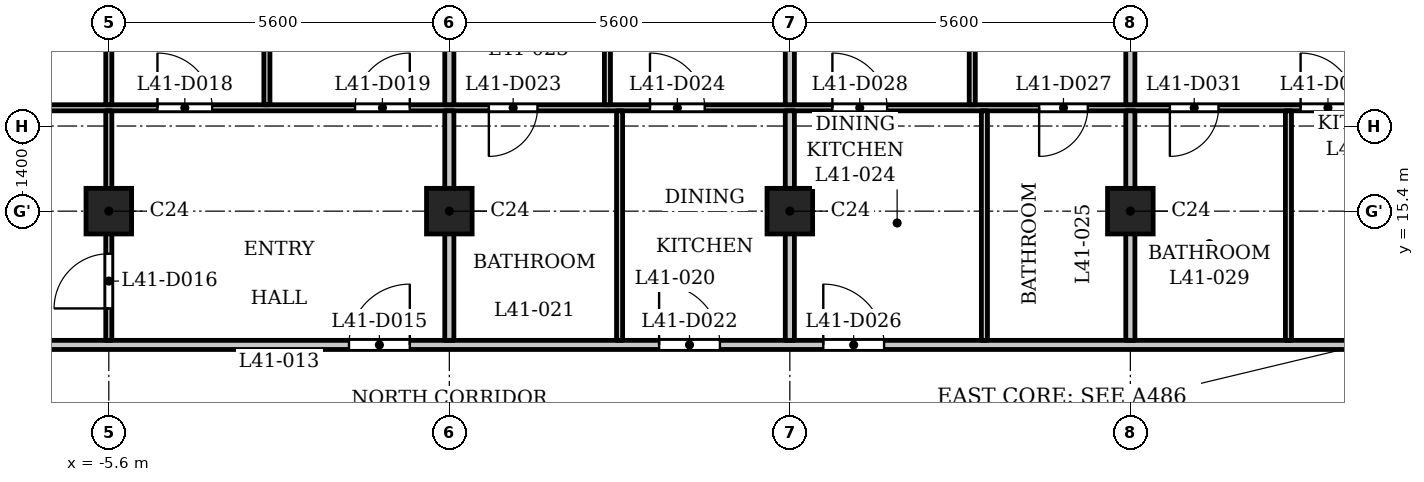
"""IFC4 building model, lengths in metres.
Left out: names, types, materials, properties, quantities, classifications, styles, units other than length and angle.
Written with IfcOpenShell. Run it as: python <this file> out.ifc"""

import sys

from ifc_helpers import new_model, si_unit, direction, frame, frame_2d, origin, origin_2d, place, context, subcontext, project, spatial, rectangle, extrude, element, fill, save


model = new_model("IFC4")
c1 = context("Model", 3, precision=1e-05, world=origin(), true_north=direction((0.0, 1.0)))
c2 = subcontext(c1, "Body", "Model", "MODEL_VIEW")
j1 = project(units=[si_unit("LENGTHUNIT", "METRE"), si_unit("PLANEANGLEUNIT", "RADIAN")], contexts=[c1])
p1 = place(None, origin())
s1 = spatial("IfcSite", under=j1, at=p1, CompositionType="ELEMENT")
p2 = place(p1, origin())
s2 = spatial("IfcBuilding", under=s1, at=p2, CompositionType="ELEMENT")
p3 = place(p2, frame((0.0, 0.0, 160.6)))
s3 = spatial("IfcBuildingStorey", under=s2, at=p3, CompositionType="ELEMENT", Elevation=160.6)
for number, where, z_axis, x_axis in (
    (1, (-5.6, 15.4, 0.0), (0.0, 0.0, 1.0), (1.0, 0.0, 0.0)),
    (2, (0.0, 15.4, 0.0), (0.0, 0.0, 1.0), (1.0, 0.0, 0.0)),
    (3, (5.6, 15.4, 0.0), (0.0, 0.0, 1.0), (1.0, 0.0, 0.0)),
    (4, (11.2, 15.4, 0.0), (0.0, 0.0, 1.0), (1.0, 0.0, 0.0)),
):
    element("IfcColumn", number, at=place(p3, frame(where, z_axis=z_axis, x_axis=x_axis)), inside=s3, PredefinedType="COLUMN", context=c2, shape_type="SweptSolid", body=[
        extrude(rectangle(XDim=0.75, YDim=0.75, at=origin_2d()), origin(), (0.0, 0.0, 1.0), 3.5),
    ])
p4 = place(p3, frame((-17.4, 13.2, 0.0), z_axis=(0.0, 0.0, 1.0), x_axis=(1.0, 0.0, 0.0)))
e5 = element("IfcWall", 5, at=p4, inside=s3, PredefinedType="PARTITIONING", context=c2, shape_type="SweptSolid", body=[
    extrude(rectangle(XDim=34.8, YDim=0.15, at=frame_2d((17.4, 0.0))), origin(), (0.0, 0.0, 1.0), 3.2),
])
p5 = place(p4, frame((0.25, 0.0, 0.0)))
e6 = element("IfcOpeningElement", 6, at=p5, cuts=e5, PredefinedType="OPENING", context=c2, shape_type="SweptSolid", body=[
    extrude(rectangle(XDim=1.0, YDim=2.1, at=frame_2d((0.5, 1.05))), frame((0.0, 0.085, 0.0), z_axis=(0.0, -1.0, 0.0), x_axis=(1.0, 0.0, 0.0)), (0.0, 0.0, 1.0), 0.17),
])
p6 = place(p4, frame((33.65, 0.0, 0.0)))
e7 = element("IfcOpeningElement", 7, at=p6, cuts=e5, PredefinedType="OPENING", context=c2, shape_type="SweptSolid", body=[
    extrude(rectangle(XDim=1.0, YDim=2.1, at=frame_2d((0.5, 1.05))), frame((0.0, 0.085, 0.0), z_axis=(0.0, -1.0, 0.0), x_axis=(1.0, 0.0, 0.0)), (0.0, 0.0, 1.0), 0.17),
])
p7 = place(p4, frame((15.75, 0.0, 0.0)))
e8 = element("IfcOpeningElement", 8, at=p7, cuts=e5, PredefinedType="OPENING", context=c2, shape_type="SweptSolid", body=[
    extrude(rectangle(XDim=1.0, YDim=2.1, at=frame_2d((0.5, 1.05))), frame((0.0, 0.085, 0.0), z_axis=(0.0, -1.0, 0.0), x_axis=(1.0, 0.0, 0.0)), (0.0, 0.0, 1.0), 0.17),
])
p8 = place(p4, frame((20.85, 0.0, 0.0)))
e9 = element("IfcOpeningElement", 9, at=p8, cuts=e5, PredefinedType="OPENING", context=c2, shape_type="SweptSolid", body=[
    extrude(rectangle(XDim=1.0, YDim=2.1, at=frame_2d((0.5, 1.05))), frame((0.0, 0.085, 0.0), z_axis=(0.0, -1.0, 0.0), x_axis=(1.0, 0.0, 0.0)), (0.0, 0.0, 1.0), 0.17),
])
p9 = place(p4, frame((23.55, 0.0, 0.0)))
e10 = element("IfcOpeningElement", 10, at=p9, cuts=e5, PredefinedType="OPENING", context=c2, shape_type="SweptSolid", body=[
    extrude(rectangle(XDim=1.0, YDim=2.1, at=frame_2d((0.5, 1.05))), frame((0.0, 0.085, 0.0), z_axis=(0.0, -1.0, 0.0), x_axis=(1.0, 0.0, 0.0)), (0.0, 0.0, 1.0), 0.17),
])
p10 = place(p3, frame((-16.725, 17.1, 0.0), z_axis=(0.0, 0.0, 1.0), x_axis=(1.0, 0.0, 0.0)))
e11 = element("IfcWall", 11, at=p10, inside=s3, PredefinedType="PARTITIONING", context=c2, shape_type="SweptSolid", body=[
    extrude(rectangle(XDim=33.45, YDim=0.1, at=frame_2d((16.725, 0.0))), origin(), (0.0, 0.0, 1.0), 3.2),
])
p11 = place(p10, frame((11.925, 0.0, 0.0)))
e12 = element("IfcOpeningElement", 12, at=p11, cuts=e11, PredefinedType="OPENING", context=c2, shape_type="SweptSolid", body=[
    extrude(rectangle(XDim=0.9, YDim=2.1, at=frame_2d((0.45, 1.05))), frame((0.0, 0.06, 0.0), z_axis=(0.0, -1.0, 0.0), x_axis=(1.0, 0.0, 0.0)), (0.0, 0.0, 1.0), 0.12),
])
p12 = place(p10, frame((15.175, 0.0, 0.0)))
e13 = element("IfcOpeningElement", 13, at=p12, cuts=e11, PredefinedType="OPENING", context=c2, shape_type="SweptSolid", body=[
    extrude(rectangle(XDim=0.9, YDim=2.1, at=frame_2d((0.45, 1.05))), frame((0.0, 0.06, 0.0), z_axis=(0.0, -1.0, 0.0), x_axis=(1.0, 0.0, 0.0)), (0.0, 0.0, 1.0), 0.12),
])
p13 = place(p10, frame((6.575, 0.0, 0.0)))
e14 = element("IfcOpeningElement", 14, at=p13, cuts=e11, PredefinedType="OPENING", context=c2, shape_type="SweptSolid", body=[
    extrude(rectangle(XDim=0.9, YDim=2.1, at=frame_2d((0.45, 1.05))), frame((0.0, 0.06, 0.0), z_axis=(0.0, -1.0, 0.0), x_axis=(1.0, 0.0, 0.0)), (0.0, 0.0, 1.0), 0.12),
])
p14 = place(p10, frame((17.375, 0.0, 0.0)))
e15 = element("IfcOpeningElement", 15, at=p14, cuts=e11, PredefinedType="OPENING", context=c2, shape_type="SweptSolid", body=[
    extrude(rectangle(XDim=0.8, YDim=2.1, at=frame_2d((0.4, 1.05))), frame((0.0, 0.06, 0.0), z_axis=(0.0, -1.0, 0.0), x_axis=(1.0, 0.0, 0.0)), (0.0, 0.0, 1.0), 0.12),
])
p15 = place(p10, frame((20.025, 0.0, 0.0)))
e16 = element("IfcOpeningElement", 16, at=p15, cuts=e11, PredefinedType="OPENING", context=c2, shape_type="SweptSolid", body=[
    extrude(rectangle(XDim=0.9, YDim=2.1, at=frame_2d((0.45, 1.05))), frame((0.0, 0.06, 0.0), z_axis=(0.0, -1.0, 0.0), x_axis=(1.0, 0.0, 0.0)), (0.0, 0.0, 1.0), 0.12),
])
p16 = place(p10, frame((26.425, 0.0, 0.0)))
e17 = element("IfcOpeningElement", 17, at=p16, cuts=e11, PredefinedType="OPENING", context=c2, shape_type="SweptSolid", body=[
    extrude(rectangle(XDim=0.8, YDim=2.1, at=frame_2d((0.4, 1.05))), frame((0.0, 0.06, 0.0), z_axis=(0.0, -1.0, 0.0), x_axis=(1.0, 0.0, 0.0)), (0.0, 0.0, 1.0), 0.12),
])
p17 = place(p10, frame((23.025, 0.0, 0.0)))
e18 = element("IfcOpeningElement", 18, at=p17, cuts=e11, PredefinedType="OPENING", context=c2, shape_type="SweptSolid", body=[
    extrude(rectangle(XDim=0.9, YDim=2.1, at=frame_2d((0.45, 1.05))), frame((0.0, 0.06, 0.0), z_axis=(0.0, -1.0, 0.0), x_axis=(1.0, 0.0, 0.0)), (0.0, 0.0, 1.0), 0.12),
])
p18 = place(p10, frame((28.575, 0.0, 0.0)))
e19 = element("IfcOpeningElement", 19, at=p18, cuts=e11, PredefinedType="OPENING", context=c2, shape_type="SweptSolid", body=[
    extrude(rectangle(XDim=0.8, YDim=2.1, at=frame_2d((0.4, 1.05))), frame((0.0, 0.06, 0.0), z_axis=(0.0, -1.0, 0.0), x_axis=(1.0, 0.0, 0.0)), (0.0, 0.0, 1.0), 0.12),
])
p19 = place(p10, frame((30.725, 0.0, 0.0)))
e20 = element("IfcOpeningElement", 20, at=p19, cuts=e11, PredefinedType="OPENING", context=c2, shape_type="SweptSolid", body=[
    extrude(rectangle(XDim=0.9, YDim=2.1, at=frame_2d((0.45, 1.05))), frame((0.0, 0.06, 0.0), z_axis=(0.0, -1.0, 0.0), x_axis=(1.0, 0.0, 0.0)), (0.0, 0.0, 1.0), 0.12),
])
p20 = place(p3, frame((-5.6, 13.275, 0.0), z_axis=(0.0, 0.0, 1.0), x_axis=(0.0, 1.0, 0.0)))
e21 = element("IfcWall", 21, at=p20, inside=s3, PredefinedType="PARTITIONING", context=c2, shape_type="SweptSolid", body=[
    extrude(rectangle(XDim=3.775, YDim=0.1, at=frame_2d((1.888, 0.0))), origin(), (0.0, 0.0, 1.0), 3.2),
])
p21 = place(p20, frame((0.525, 0.0, 0.0)))
e22 = element("IfcOpeningElement", 22, at=p21, cuts=e21, PredefinedType="OPENING", context=c2, shape_type="SweptSolid", body=[
    extrude(rectangle(XDim=0.9, YDim=2.1, at=frame_2d((0.45, 1.05))), frame((0.0, 0.06, 0.0), z_axis=(0.0, -1.0, 0.0), x_axis=(1.0, 0.0, 0.0)), (0.0, 0.0, 1.0), 0.12),
])
p22 = place(p3, frame((-5.6, 17.15, 0.0), z_axis=(0.0, 0.0, 1.0), x_axis=(0.0, 1.0, 0.0)))
e23 = element("IfcWall", 23, at=p22, inside=s3, PredefinedType="PARTITIONING", context=c2, shape_type="SweptSolid", body=[
    extrude(rectangle(XDim=5.73, YDim=0.1, at=frame_2d((2.865, 0.0))), origin(), (0.0, 0.0, 1.0), 3.2),
])
p23 = place(p3, frame((-3.0, 17.15, 0.0), z_axis=(0.0, 0.0, 1.0), x_axis=(0.0, 1.0, 0.0)))
e24 = element("IfcWall", 24, at=p23, inside=s3, PredefinedType="PARTITIONING", context=c2, shape_type="SweptSolid", body=[
    extrude(rectangle(XDim=4.93, YDim=0.1, at=frame_2d((2.465, 0.0))), origin(), (0.0, 0.0, 1.0), 3.2),
])
p24 = place(p3, frame((0.0, 13.275, 0.0), z_axis=(0.0, 0.0, 1.0), x_axis=(0.0, 1.0, 0.0)))
e25 = element("IfcWall", 25, at=p24, inside=s3, PredefinedType="PARTITIONING", context=c2, shape_type="SweptSolid", body=[
    extrude(rectangle(XDim=3.775, YDim=0.15, at=frame_2d((1.888, 0.0))), origin(), (0.0, 0.0, 1.0), 3.2),
])
p25 = place(p3, frame((0.0, 17.15, 0.0), z_axis=(0.0, 0.0, 1.0), x_axis=(0.0, 1.0, 0.0)))
e26 = element("IfcWall", 26, at=p25, inside=s3, PredefinedType="PARTITIONING", context=c2, shape_type="SweptSolid", body=[
    extrude(rectangle(XDim=5.73, YDim=0.15, at=frame_2d((2.865, 0.0))), origin(), (0.0, 0.0, 1.0), 3.2),
])
p26 = place(p3, frame((2.6, 17.15, 0.0), z_axis=(0.0, 0.0, 1.0), x_axis=(0.0, 1.0, 0.0)))
e27 = element("IfcWall", 27, at=p26, inside=s3, PredefinedType="PARTITIONING", context=c2, shape_type="SweptSolid", body=[
    extrude(rectangle(XDim=4.93, YDim=0.1, at=frame_2d((2.465, 0.0))), origin(), (0.0, 0.0, 1.0), 3.2),
])
p27 = place(p26, frame((3.61, 0.0, 0.0)))
e28 = element("IfcOpeningElement", 28, at=p27, cuts=e27, PredefinedType="OPENING", context=c2, shape_type="SweptSolid", body=[
    extrude(rectangle(XDim=0.9, YDim=2.1, at=frame_2d((0.45, 1.05))), frame((0.0, 0.06, 0.0), z_axis=(0.0, -1.0, 0.0), x_axis=(1.0, 0.0, 0.0)), (0.0, 0.0, 1.0), 0.12),
])
p28 = place(p3, frame((2.8, 13.275, 0.0), z_axis=(0.0, 0.0, 1.0), x_axis=(0.0, 1.0, 0.0)))
e29 = element("IfcWall", 29, at=p28, inside=s3, PredefinedType="PARTITIONING", context=c2, shape_type="SweptSolid", body=[
    extrude(rectangle(XDim=3.775, YDim=0.1, at=frame_2d((1.888, 0.0))), origin(), (0.0, 0.0, 1.0), 3.2),
])
p29 = place(p3, frame((5.6, 13.275, 0.0), z_axis=(0.0, 0.0, 1.0), x_axis=(0.0, 1.0, 0.0)))
e30 = element("IfcWall", 30, at=p29, inside=s3, PredefinedType="PARTITIONING", context=c2, shape_type="SweptSolid", body=[
    extrude(rectangle(XDim=3.775, YDim=0.15, at=frame_2d((1.888, 0.0))), origin(), (0.0, 0.0, 1.0), 3.2),
])
p30 = place(p3, frame((5.6, 17.15, 0.0), z_axis=(0.0, 0.0, 1.0), x_axis=(0.0, 1.0, 0.0)))
e31 = element("IfcWall", 31, at=p30, inside=s3, PredefinedType="PARTITIONING", context=c2, shape_type="SweptSolid", body=[
    extrude(rectangle(XDim=5.73, YDim=0.15, at=frame_2d((2.865, 0.0))), origin(), (0.0, 0.0, 1.0), 3.2),
])
p31 = place(p3, frame((8.6, 17.15, 0.0), z_axis=(0.0, 0.0, 1.0), x_axis=(0.0, 1.0, 0.0)))
e32 = element("IfcWall", 32, at=p31, inside=s3, PredefinedType="PARTITIONING", context=c2, shape_type="SweptSolid", body=[
    extrude(rectangle(XDim=4.93, YDim=0.1, at=frame_2d((2.465, 0.0))), origin(), (0.0, 0.0, 1.0), 3.2),
])
p32 = place(p31, frame((1.35, 0.0, 0.0)))
e33 = element("IfcOpeningElement", 33, at=p32, cuts=e32, PredefinedType="OPENING", context=c2, shape_type="SweptSolid", body=[
    extrude(rectangle(XDim=0.9, YDim=2.1, at=frame_2d((0.45, 1.05))), frame((0.0, 0.06, 0.0), z_axis=(0.0, -1.0, 0.0), x_axis=(1.0, 0.0, 0.0)), (0.0, 0.0, 1.0), 0.12),
])
p33 = place(p3, frame((8.8, 13.275, 0.0), z_axis=(0.0, 0.0, 1.0), x_axis=(0.0, 1.0, 0.0)))
e34 = element("IfcWall", 34, at=p33, inside=s3, PredefinedType="PARTITIONING", context=c2, shape_type="SweptSolid", body=[
    extrude(rectangle(XDim=3.775, YDim=0.1, at=frame_2d((1.888, 0.0))), origin(), (0.0, 0.0, 1.0), 3.2),
])
p34 = place(p3, frame((11.2, 13.275, 0.0), z_axis=(0.0, 0.0, 1.0), x_axis=(0.0, 1.0, 0.0)))
e35 = element("IfcWall", 35, at=p34, inside=s3, PredefinedType="PARTITIONING", context=c2, shape_type="SweptSolid", body=[
    extrude(rectangle(XDim=3.775, YDim=0.15, at=frame_2d((1.888, 0.0))), origin(), (0.0, 0.0, 1.0), 3.2),
])
p35 = place(p3, frame((11.2, 17.15, 0.0), z_axis=(0.0, 0.0, 1.0), x_axis=(0.0, 1.0, 0.0)))
e36 = element("IfcWall", 36, at=p35, inside=s3, PredefinedType="PARTITIONING", context=c2, shape_type="SweptSolid", body=[
    extrude(rectangle(XDim=5.73, YDim=0.15, at=frame_2d((2.865, 0.0))), origin(), (0.0, 0.0, 1.0), 3.2),
])
p36 = place(p3, frame((13.8, 13.275, 0.0), z_axis=(0.0, 0.0, 1.0), x_axis=(0.0, 1.0, 0.0)))
e37 = element("IfcWall", 37, at=p36, inside=s3, PredefinedType="PARTITIONING", context=c2, shape_type="SweptSolid", body=[
    extrude(rectangle(XDim=3.775, YDim=0.1, at=frame_2d((1.888, 0.0))), origin(), (0.0, 0.0, 1.0), 3.2),
])
p37 = place(p7, origin())
e38 = element("IfcDoor", 38, at=p37, inside=s3, OperationType="SINGLE_SWING_LEFT", PredefinedType="DOOR", context=c2, shape_type="SweptSolid", body=[
    extrude(rectangle(XDim=1.0, YDim=2.1, at=frame_2d((0.5, 1.05))), frame((0.0, 0.025, 0.0), z_axis=(0.0, -1.0, 0.0), x_axis=(1.0, 0.0, 0.0)), (0.0, 0.0, 1.0), 0.05),
])
fill(e8, e38)
p38 = place(p21, origin())
e39 = element("IfcDoor", 39, at=p38, inside=s3, OperationType="SINGLE_SWING_RIGHT", PredefinedType="DOOR", context=c2, shape_type="SweptSolid", body=[
    extrude(rectangle(XDim=0.9, YDim=2.1, at=frame_2d((0.45, 1.05))), frame((0.0, 0.025, 0.0), z_axis=(0.0, -1.0, 0.0), x_axis=(1.0, 0.0, 0.0)), (0.0, 0.0, 1.0), 0.05),
])
fill(e22, e39)
p39 = place(p11, origin())
e40 = element("IfcDoor", 40, at=p39, inside=s3, OperationType="SINGLE_SWING_RIGHT", PredefinedType="DOOR", context=c2, shape_type="SweptSolid", body=[
    extrude(rectangle(XDim=0.9, YDim=2.1, at=frame_2d((0.45, 1.05))), frame((0.0, 0.025, 0.0), z_axis=(0.0, -1.0, 0.0), x_axis=(1.0, 0.0, 0.0)), (0.0, 0.0, 1.0), 0.05),
])
fill(e12, e40)
p40 = place(p12, origin())
e41 = element("IfcDoor", 41, at=p40, inside=s3, OperationType="SINGLE_SWING_LEFT", PredefinedType="DOOR", context=c2, shape_type="SweptSolid", body=[
    extrude(rectangle(XDim=0.9, YDim=2.1, at=frame_2d((0.45, 1.05))), frame((0.0, 0.025, 0.0), z_axis=(0.0, -1.0, 0.0), x_axis=(1.0, 0.0, 0.0)), (0.0, 0.0, 1.0), 0.05),
])
fill(e13, e41)
p41 = place(p8, origin())
e42 = element("IfcDoor", 42, at=p41, inside=s3, OperationType="SINGLE_SWING_RIGHT", PredefinedType="DOOR", context=c2, shape_type="SweptSolid", body=[
    extrude(rectangle(XDim=1.0, YDim=2.1, at=frame_2d((0.5, 1.05))), frame((0.0, 0.025, 0.0), z_axis=(0.0, -1.0, 0.0), x_axis=(1.0, 0.0, 0.0)), (0.0, 0.0, 1.0), 0.05),
])
fill(e9, e42)
p42 = place(p14, origin())
e43 = element("IfcDoor", 43, at=p42, inside=s3, OperationType="SINGLE_SWING_LEFT", PredefinedType="DOOR", context=c2, shape_type="SweptSolid", body=[
    extrude(rectangle(XDim=0.8, YDim=2.1, at=frame_2d((0.4, 1.05))), frame((0.0, 0.025, 0.0), z_axis=(0.0, -1.0, 0.0), x_axis=(1.0, 0.0, 0.0)), (0.0, 0.0, 1.0), 0.05),
])
fill(e15, e43)
p43 = place(p15, origin())
e44 = element("IfcDoor", 44, at=p43, inside=s3, OperationType="SINGLE_SWING_RIGHT", PredefinedType="DOOR", context=c2, shape_type="SweptSolid", body=[
    extrude(rectangle(XDim=0.9, YDim=2.1, at=frame_2d((0.45, 1.05))), frame((0.0, 0.025, 0.0), z_axis=(0.0, -1.0, 0.0), x_axis=(1.0, 0.0, 0.0)), (0.0, 0.0, 1.0), 0.05),
])
fill(e16, e44)
p44 = place(p9, origin())
e45 = element("IfcDoor", 45, at=p44, inside=s3, OperationType="SINGLE_SWING_RIGHT", PredefinedType="DOOR", context=c2, shape_type="SweptSolid", body=[
    extrude(rectangle(XDim=1.0, YDim=2.1, at=frame_2d((0.5, 1.05))), frame((0.0, 0.025, 0.0), z_axis=(0.0, -1.0, 0.0), x_axis=(1.0, 0.0, 0.0)), (0.0, 0.0, 1.0), 0.05),
])
fill(e10, e45)
p45 = place(p16, origin())
e46 = element("IfcDoor", 46, at=p45, inside=s3, OperationType="SINGLE_SWING_LEFT", PredefinedType="DOOR", context=c2, shape_type="SweptSolid", body=[
    extrude(rectangle(XDim=0.8, YDim=2.1, at=frame_2d((0.4, 1.05))), frame((0.0, 0.025, 0.0), z_axis=(0.0, -1.0, 0.0), x_axis=(1.0, 0.0, 0.0)), (0.0, 0.0, 1.0), 0.05),
])
fill(e17, e46)
p46 = place(p17, origin())
e47 = element("IfcDoor", 47, at=p46, inside=s3, OperationType="SINGLE_SWING_RIGHT", PredefinedType="DOOR", context=c2, shape_type="SweptSolid", body=[
    extrude(rectangle(XDim=0.9, YDim=2.1, at=frame_2d((0.45, 1.05))), frame((0.0, 0.025, 0.0), z_axis=(0.0, -1.0, 0.0), x_axis=(1.0, 0.0, 0.0)), (0.0, 0.0, 1.0), 0.05),
])
fill(e18, e47)
p47 = place(p18, origin())
e48 = element("IfcDoor", 48, at=p47, inside=s3, OperationType="SINGLE_SWING_LEFT", PredefinedType="DOOR", context=c2, shape_type="SweptSolid", body=[
    extrude(rectangle(XDim=0.8, YDim=2.1, at=frame_2d((0.4, 1.05))), frame((0.0, 0.025, 0.0), z_axis=(0.0, -1.0, 0.0), x_axis=(1.0, 0.0, 0.0)), (0.0, 0.0, 1.0), 0.05),
])
fill(e19, e48)
p48 = place(p19, origin())
e49 = element("IfcDoor", 49, at=p48, inside=s3, OperationType="SINGLE_SWING_RIGHT", PredefinedType="DOOR", context=c2, shape_type="SweptSolid", body=[
    extrude(rectangle(XDim=0.9, YDim=2.1, at=frame_2d((0.45, 1.05))), frame((0.0, 0.025, 0.0), z_axis=(0.0, -1.0, 0.0), x_axis=(1.0, 0.0, 0.0)), (0.0, 0.0, 1.0), 0.05),
])
fill(e20, e49)
save(model, sys.argv[1])
